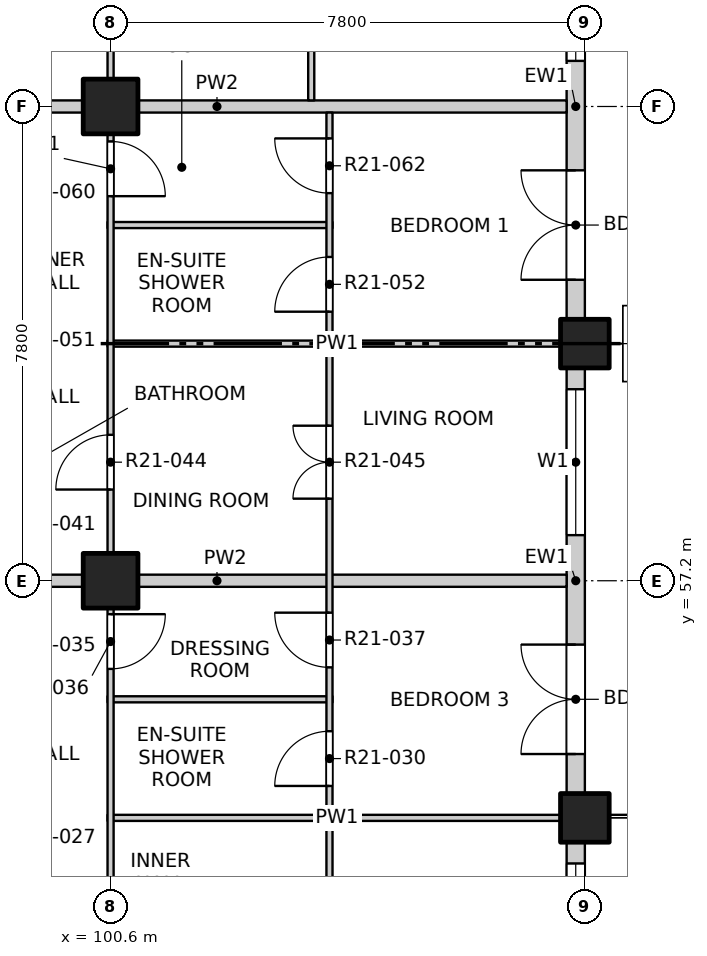
"""IFC4 building model, lengths in metres.
Left out: names, types, materials, properties, quantities, classifications, styles, units other than length and angle.
Written with IfcOpenShell. Run it as: python <this file> out.ifc"""

import sys

from ifc_helpers import new_model, si_unit, direction, frame, frame_2d, origin, origin_2d, place, context, subcontext, project, spatial, rectangle, extrude, element, fill, save


model = new_model("IFC4")
c1 = context("Model", 3, precision=1e-05, world=origin(), true_north=direction((0.0, 1.0)))
c2 = subcontext(c1, "Body", "Model", "MODEL_VIEW")
j1 = project(units=[si_unit("LENGTHUNIT", "METRE"), si_unit("PLANEANGLEUNIT", "RADIAN")], contexts=[c1])
p1 = place(None, origin())
s1 = spatial("IfcSite", under=j1, at=p1, CompositionType="ELEMENT")
p2 = place(p1, origin())
s2 = spatial("IfcBuilding", under=s1, at=p2, CompositionType="ELEMENT")
p3 = place(p2, frame((0.0, 0.0, 214.3)))
s3 = spatial("IfcBuildingStorey", under=s2, at=p3, CompositionType="ELEMENT", Elevation=214.3)
for number, where, z_axis, x_axis in (
    (1, (108.4, 53.3, -0.25), (0.0, 0.0, 1.0), (1.0, 0.0, 0.0)),
    (2, (108.4, 61.1, -0.25), (0.0, 0.0, 1.0), (1.0, 0.0, 0.0)),
):
    element("IfcColumn", number, at=place(p3, frame(where, z_axis=z_axis, x_axis=x_axis)), inside=s3, PredefinedType="COLUMN", context=c2, shape_type="SweptSolid", body=[
        extrude(rectangle(XDim=0.8, YDim=0.8, at=origin_2d()), origin(), (0.0, 0.0, 1.0), 3.4),
    ])
for number, where, z_axis, x_axis in (
    (3, (100.6, 57.2, -0.25), (0.0, 0.0, 1.0), (1.0, 0.0, 0.0)),
    (4, (100.6, 65.0, -0.25), (0.0, 0.0, 1.0), (1.0, 0.0, 0.0)),
):
    element("IfcColumn", number, at=place(p3, frame(where, z_axis=z_axis, x_axis=x_axis)), inside=s3, PredefinedType="COLUMN", context=c2, shape_type="SweptSolid", body=[
        extrude(rectangle(XDim=0.9, YDim=0.9, at=origin_2d()), origin(), (0.0, 0.0, 1.0), 3.4),
    ])
p4 = place(p3, frame((108.25, 45.5, 0.0), z_axis=(0.0, 0.0, 1.0), x_axis=(0.0, 1.0, 0.0)))
e5 = element("IfcWall", 5, at=p4, inside=s3, PredefinedType="SOLIDWALL", context=c2, shape_type="SweptSolid", body=[
    extrude(rectangle(XDim=7.4, YDim=0.3, at=frame_2d((3.7, 0.0))), origin(), (0.0, 0.0, 1.0), 2.7),
])
p5 = place(p4, frame((0.75, 0.0, 0.9)))
e6 = element("IfcOpeningElement", 6, at=p5, cuts=e5, PredefinedType="OPENING", context=c2, shape_type="SweptSolid", body=[
    extrude(rectangle(XDim=2.4, YDim=1.8, at=frame_2d((1.2, 0.9))), frame((0.0, 0.16, 0.0), z_axis=(0.0, -1.0, 0.0), x_axis=(1.0, 0.0, 0.0)), (0.0, 0.0, 1.0), 0.32),
])
p6 = place(p4, frame((4.65, 0.0, 0.9)))
e7 = element("IfcOpeningElement", 7, at=p6, cuts=e5, PredefinedType="OPENING", context=c2, shape_type="SweptSolid", body=[
    extrude(rectangle(XDim=2.4, YDim=1.8, at=frame_2d((1.2, 0.9))), frame((0.0, 0.16, 0.0), z_axis=(0.0, -1.0, 0.0), x_axis=(1.0, 0.0, 0.0)), (0.0, 0.0, 1.0), 0.32),
])
p7 = place(p3, frame((108.25, 53.7, 0.0), z_axis=(0.0, 0.0, 1.0), x_axis=(0.0, 1.0, 0.0)))
e8 = element("IfcWall", 8, at=p7, inside=s3, PredefinedType="SOLIDWALL", context=c2, shape_type="SweptSolid", body=[
    extrude(rectangle(XDim=7.0, YDim=0.3, at=frame_2d((3.5, 0.0))), origin(), (0.0, 0.0, 1.0), 2.7),
])
p8 = place(p7, frame((0.65, 0.0, 0.0)))
e9 = element("IfcOpeningElement", 9, at=p8, cuts=e8, PredefinedType="OPENING", context=c2, shape_type="SweptSolid", body=[
    extrude(rectangle(XDim=1.8, YDim=2.4, at=frame_2d((0.9, 1.2))), frame((0.0, 0.16, 0.0), z_axis=(0.0, -1.0, 0.0), x_axis=(1.0, 0.0, 0.0)), (0.0, 0.0, 1.0), 0.32),
])
p9 = place(p7, frame((4.25, 0.0, 0.9)))
e10 = element("IfcOpeningElement", 10, at=p9, cuts=e8, PredefinedType="OPENING", context=c2, shape_type="SweptSolid", body=[
    extrude(rectangle(XDim=2.4, YDim=1.8, at=frame_2d((1.2, 0.9))), frame((0.0, 0.16, 0.0), z_axis=(0.0, -1.0, 0.0), x_axis=(1.0, 0.0, 0.0)), (0.0, 0.0, 1.0), 0.32),
])
p10 = place(p3, frame((108.25, 61.5, 0.0), z_axis=(0.0, 0.0, 1.0), x_axis=(0.0, 1.0, 0.0)))
e11 = element("IfcWall", 11, at=p10, inside=s3, PredefinedType="SOLIDWALL", context=c2, shape_type="SweptSolid", body=[
    extrude(rectangle(XDim=7.0, YDim=0.3, at=frame_2d((3.5, 0.0))), origin(), (0.0, 0.0, 1.0), 2.7),
])
p11 = place(p10, frame((0.65, 0.0, 0.0)))
e12 = element("IfcOpeningElement", 12, at=p11, cuts=e11, PredefinedType="OPENING", context=c2, shape_type="SweptSolid", body=[
    extrude(rectangle(XDim=1.8, YDim=2.4, at=frame_2d((0.9, 1.2))), frame((0.0, 0.16, 0.0), z_axis=(0.0, -1.0, 0.0), x_axis=(1.0, 0.0, 0.0)), (0.0, 0.0, 1.0), 0.32),
])
p12 = place(p10, frame((4.25, 0.0, 0.9)))
e13 = element("IfcOpeningElement", 13, at=p12, cuts=e11, PredefinedType="OPENING", context=c2, shape_type="SweptSolid", body=[
    extrude(rectangle(XDim=2.4, YDim=1.8, at=frame_2d((1.2, 0.9))), frame((0.0, 0.16, 0.0), z_axis=(0.0, -1.0, 0.0), x_axis=(1.0, 0.0, 0.0)), (0.0, 0.0, 1.0), 0.32),
])
p13 = place(p3, frame((100.55, 53.3, 0.0), z_axis=(0.0, 0.0, 1.0), x_axis=(1.0, 0.0, 0.0)))
e14 = element("IfcWall", 14, at=p13, inside=s3, PredefinedType="PARTITIONING", context=c2, shape_type="SweptSolid", body=[
    extrude(rectangle(XDim=7.55, YDim=0.1, at=frame_2d((3.775, 0.0))), origin(), (0.0, 0.0, 1.0), 3.15),
])
p14 = place(p3, frame((100.55, 55.25, 0.0), z_axis=(0.0, 0.0, 1.0), x_axis=(1.0, 0.0, 0.0)))
e15 = element("IfcWall", 15, at=p14, inside=s3, PredefinedType="PARTITIONING", context=c2, shape_type="SweptSolid", body=[
    extrude(rectangle(XDim=3.7, YDim=0.1, at=frame_2d((1.85, 0.0))), origin(), (0.0, 0.0, 1.0), 3.15),
])
p15 = place(p3, frame((96.6, 57.2, 0.0), z_axis=(0.0, 0.0, 1.0), x_axis=(1.0, 0.0, 0.0)))
e16 = element("IfcWall", 16, at=p15, inside=s3, PredefinedType="PARTITIONING", context=c2, shape_type="SweptSolid", body=[
    extrude(rectangle(XDim=11.5, YDim=0.2, at=frame_2d((5.75, 0.0))), origin(), (0.0, 0.0, 1.0), 3.15),
])
p16 = place(p3, frame((100.55, 61.1, 0.0), z_axis=(0.0, 0.0, 1.0), x_axis=(1.0, 0.0, 0.0)))
e17 = element("IfcWall", 17, at=p16, inside=s3, PredefinedType="PARTITIONING", context=c2, shape_type="SweptSolid", body=[
    extrude(rectangle(XDim=7.55, YDim=0.1, at=frame_2d((3.775, 0.0))), origin(), (0.0, 0.0, 1.0), 2.55),
])
p17 = place(p3, frame((100.55, 63.05, 0.0), z_axis=(0.0, 0.0, 1.0), x_axis=(1.0, 0.0, 0.0)))
e18 = element("IfcWall", 18, at=p17, inside=s3, PredefinedType="PARTITIONING", context=c2, shape_type="SweptSolid", body=[
    extrude(rectangle(XDim=3.7, YDim=0.1, at=frame_2d((1.85, 0.0))), origin(), (0.0, 0.0, 1.0), 3.15),
])
p18 = place(p3, frame((96.6, 65.0, 0.0), z_axis=(0.0, 0.0, 1.0), x_axis=(1.0, 0.0, 0.0)))
e19 = element("IfcWall", 19, at=p18, inside=s3, PredefinedType="PARTITIONING", context=c2, shape_type="SweptSolid", body=[
    extrude(rectangle(XDim=11.5, YDim=0.2, at=frame_2d((5.75, 0.0))), origin(), (0.0, 0.0, 1.0), 3.15),
])
p19 = place(p3, frame((100.6, 41.9, 0.0), z_axis=(0.0, 0.0, 1.0), x_axis=(0.0, 1.0, 0.0)))
e20 = element("IfcWall", 20, at=p19, inside=s3, PredefinedType="PARTITIONING", context=c2, shape_type="SweptSolid", body=[
    extrude(rectangle(XDim=46.2, YDim=0.1, at=frame_2d((23.1, 0.0))), origin(), (0.0, 0.0, 1.0), 3.15),
])
p20 = place(p19, frame((1.2, 0.0, 0.0)))
e21 = element("IfcOpeningElement", 21, at=p20, cuts=e20, PredefinedType="OPENING", context=c2, shape_type="SweptSolid", body=[
    extrude(rectangle(XDim=0.9, YDim=2.1, at=frame_2d((0.45, 1.05))), frame((0.0, 0.06, 0.0), z_axis=(0.0, -1.0, 0.0), x_axis=(1.0, 0.0, 0.0)), (0.0, 0.0, 1.0), 0.12),
])
p21 = place(p19, frame((6.025, 0.0, 0.0)))
e22 = element("IfcOpeningElement", 22, at=p21, cuts=e20, PredefinedType="OPENING", context=c2, shape_type="SweptSolid", body=[
    extrude(rectangle(XDim=0.9, YDim=2.1, at=frame_2d((0.45, 1.05))), frame((0.0, 0.06, 0.0), z_axis=(0.0, -1.0, 0.0), x_axis=(1.0, 0.0, 0.0)), (0.0, 0.0, 1.0), 0.12),
])
p22 = place(p19, frame((9.0, 0.0, 0.0)))
e23 = element("IfcOpeningElement", 23, at=p22, cuts=e20, PredefinedType="OPENING", context=c2, shape_type="SweptSolid", body=[
    extrude(rectangle(XDim=0.9, YDim=2.1, at=frame_2d((0.45, 1.05))), frame((0.0, 0.06, 0.0), z_axis=(0.0, -1.0, 0.0), x_axis=(1.0, 0.0, 0.0)), (0.0, 0.0, 1.0), 0.12),
])
p23 = place(p19, frame((13.85, 0.0, 0.0)))
e24 = element("IfcOpeningElement", 24, at=p23, cuts=e20, PredefinedType="OPENING", context=c2, shape_type="SweptSolid", body=[
    extrude(rectangle(XDim=0.9, YDim=2.1, at=frame_2d((0.45, 1.05))), frame((0.0, 0.06, 0.0), z_axis=(0.0, -1.0, 0.0), x_axis=(1.0, 0.0, 0.0)), (0.0, 0.0, 1.0), 0.12),
])
p24 = place(p19, frame((16.8, 0.0, 0.0)))
e25 = element("IfcOpeningElement", 25, at=p24, cuts=e20, PredefinedType="OPENING", context=c2, shape_type="SweptSolid", body=[
    extrude(rectangle(XDim=0.9, YDim=2.1, at=frame_2d((0.45, 1.05))), frame((0.0, 0.06, 0.0), z_axis=(0.0, -1.0, 0.0), x_axis=(1.0, 0.0, 0.0)), (0.0, 0.0, 1.0), 0.12),
])
p25 = place(p19, frame((21.625, 0.0, 0.0)))
e26 = element("IfcOpeningElement", 26, at=p25, cuts=e20, PredefinedType="OPENING", context=c2, shape_type="SweptSolid", body=[
    extrude(rectangle(XDim=0.9, YDim=2.1, at=frame_2d((0.45, 1.05))), frame((0.0, 0.06, 0.0), z_axis=(0.0, -1.0, 0.0), x_axis=(1.0, 0.0, 0.0)), (0.0, 0.0, 1.0), 0.12),
])
p26 = place(p19, frame((24.6, 0.0, 0.0)))
e27 = element("IfcOpeningElement", 27, at=p26, cuts=e20, PredefinedType="OPENING", context=c2, shape_type="SweptSolid", body=[
    extrude(rectangle(XDim=0.9, YDim=2.1, at=frame_2d((0.45, 1.05))), frame((0.0, 0.06, 0.0), z_axis=(0.0, -1.0, 0.0), x_axis=(1.0, 0.0, 0.0)), (0.0, 0.0, 1.0), 0.12),
])
p27 = place(p19, frame((29.425, 0.0, 0.0)))
e28 = element("IfcOpeningElement", 28, at=p27, cuts=e20, PredefinedType="OPENING", context=c2, shape_type="SweptSolid", body=[
    extrude(rectangle(XDim=0.9, YDim=2.1, at=frame_2d((0.45, 1.05))), frame((0.0, 0.06, 0.0), z_axis=(0.0, -1.0, 0.0), x_axis=(1.0, 0.0, 0.0)), (0.0, 0.0, 1.0), 0.12),
])
p28 = place(p19, frame((33.375, 0.0, 0.0)))
e29 = element("IfcOpeningElement", 29, at=p28, cuts=e20, PredefinedType="OPENING", context=c2, shape_type="SweptSolid", body=[
    extrude(rectangle(XDim=0.9, YDim=2.1, at=frame_2d((0.45, 1.05))), frame((0.0, 0.06, 0.0), z_axis=(0.0, -1.0, 0.0), x_axis=(1.0, 0.0, 0.0)), (0.0, 0.0, 1.0), 0.12),
])
p29 = place(p19, frame((36.3, 0.0, 0.0)))
e30 = element("IfcOpeningElement", 30, at=p29, cuts=e20, PredefinedType="OPENING", context=c2, shape_type="SweptSolid", body=[
    extrude(rectangle(XDim=0.9, YDim=2.1, at=frame_2d((0.45, 1.05))), frame((0.0, 0.06, 0.0), z_axis=(0.0, -1.0, 0.0), x_axis=(1.0, 0.0, 0.0)), (0.0, 0.0, 1.0), 0.12),
])
p30 = place(p19, frame((41.175, 0.0, 0.0)))
e31 = element("IfcOpeningElement", 31, at=p30, cuts=e20, PredefinedType="OPENING", context=c2, shape_type="SweptSolid", body=[
    extrude(rectangle(XDim=0.9, YDim=2.1, at=frame_2d((0.45, 1.05))), frame((0.0, 0.06, 0.0), z_axis=(0.0, -1.0, 0.0), x_axis=(1.0, 0.0, 0.0)), (0.0, 0.0, 1.0), 0.12),
])
p31 = place(p19, frame((44.1, 0.0, 0.0)))
e32 = element("IfcOpeningElement", 32, at=p31, cuts=e20, PredefinedType="OPENING", context=c2, shape_type="SweptSolid", body=[
    extrude(rectangle(XDim=0.9, YDim=2.1, at=frame_2d((0.45, 1.05))), frame((0.0, 0.06, 0.0), z_axis=(0.0, -1.0, 0.0), x_axis=(1.0, 0.0, 0.0)), (0.0, 0.0, 1.0), 0.12),
])
p32 = place(p3, frame((103.9, 65.1, 0.0), z_axis=(0.0, 0.0, 1.0), x_axis=(0.0, 1.0, 0.0)))
e33 = element("IfcWall", 33, at=p32, inside=s3, PredefinedType="PARTITIONING", context=c2, shape_type="SweptSolid", body=[
    extrude(rectangle(XDim=11.5, YDim=0.1, at=frame_2d((5.75, 0.0))), origin(), (0.0, 0.0, 1.0), 3.15),
])
p33 = place(p32, frame((1.25, 0.0, 0.0)))
e34 = element("IfcOpeningElement", 34, at=p33, cuts=e33, PredefinedType="OPENING", context=c2, shape_type="SweptSolid", body=[
    extrude(rectangle(XDim=1.2, YDim=2.1, at=frame_2d((0.6, 1.05))), frame((0.0, 0.06, 0.0), z_axis=(0.0, -1.0, 0.0), x_axis=(1.0, 0.0, 0.0)), (0.0, 0.0, 1.0), 0.12),
])
p34 = place(p32, frame((4.325, 0.0, 0.0)))
e35 = element("IfcOpeningElement", 35, at=p34, cuts=e33, PredefinedType="OPENING", context=c2, shape_type="SweptSolid", body=[
    extrude(rectangle(XDim=0.9, YDim=2.1, at=frame_2d((0.45, 1.05))), frame((0.0, 0.06, 0.0), z_axis=(0.0, -1.0, 0.0), x_axis=(1.0, 0.0, 0.0)), (0.0, 0.0, 1.0), 0.12),
])
p35 = place(p32, frame((6.275, 0.0, 0.0)))
e36 = element("IfcOpeningElement", 36, at=p35, cuts=e33, PredefinedType="OPENING", context=c2, shape_type="SweptSolid", body=[
    extrude(rectangle(XDim=0.9, YDim=2.1, at=frame_2d((0.45, 1.05))), frame((0.0, 0.06, 0.0), z_axis=(0.0, -1.0, 0.0), x_axis=(1.0, 0.0, 0.0)), (0.0, 0.0, 1.0), 0.12),
])
p36 = place(p32, frame((8.225, 0.0, 0.0)))
e37 = element("IfcOpeningElement", 37, at=p36, cuts=e33, PredefinedType="OPENING", context=c2, shape_type="SweptSolid", body=[
    extrude(rectangle(XDim=0.9, YDim=2.1, at=frame_2d((0.45, 1.05))), frame((0.0, 0.06, 0.0), z_axis=(0.0, -1.0, 0.0), x_axis=(1.0, 0.0, 0.0)), (0.0, 0.0, 1.0), 0.12),
])
p37 = place(p32, frame((10.175, 0.0, 0.0)))
e38 = element("IfcOpeningElement", 38, at=p37, cuts=e33, PredefinedType="OPENING", context=c2, shape_type="SweptSolid", body=[
    extrude(rectangle(XDim=0.9, YDim=2.1, at=frame_2d((0.45, 1.05))), frame((0.0, 0.06, 0.0), z_axis=(0.0, -1.0, 0.0), x_axis=(1.0, 0.0, 0.0)), (0.0, 0.0, 1.0), 0.12),
])
p38 = place(p3, frame((104.2, 41.9, 0.0), z_axis=(0.0, 0.0, 1.0), x_axis=(0.0, 1.0, 0.0)))
e39 = element("IfcWall", 39, at=p38, inside=s3, PredefinedType="PARTITIONING", context=c2, shape_type="SweptSolid", body=[
    extrude(rectangle(XDim=23.0, YDim=0.1, at=frame_2d((11.5, 0.0))), origin(), (0.0, 0.0, 1.0), 3.15),
])
p39 = place(p38, frame((1.05, 0.0, 0.0)))
e40 = element("IfcOpeningElement", 40, at=p39, cuts=e39, PredefinedType="OPENING", context=c2, shape_type="SweptSolid", body=[
    extrude(rectangle(XDim=1.2, YDim=2.1, at=frame_2d((0.6, 1.05))), frame((0.0, 0.06, 0.0), z_axis=(0.0, -1.0, 0.0), x_axis=(1.0, 0.0, 0.0)), (0.0, 0.0, 1.0), 0.12),
])
p40 = place(p38, frame((4.125, 0.0, 0.0)))
e41 = element("IfcOpeningElement", 41, at=p40, cuts=e39, PredefinedType="OPENING", context=c2, shape_type="SweptSolid", body=[
    extrude(rectangle(XDim=0.9, YDim=2.1, at=frame_2d((0.45, 1.05))), frame((0.0, 0.06, 0.0), z_axis=(0.0, -1.0, 0.0), x_axis=(1.0, 0.0, 0.0)), (0.0, 0.0, 1.0), 0.12),
])
p41 = place(p38, frame((6.075, 0.0, 0.0)))
e42 = element("IfcOpeningElement", 42, at=p41, cuts=e39, PredefinedType="OPENING", context=c2, shape_type="SweptSolid", body=[
    extrude(rectangle(XDim=0.9, YDim=2.1, at=frame_2d((0.45, 1.05))), frame((0.0, 0.06, 0.0), z_axis=(0.0, -1.0, 0.0), x_axis=(1.0, 0.0, 0.0)), (0.0, 0.0, 1.0), 0.12),
])
p42 = place(p38, frame((8.85, 0.0, 0.0)))
e43 = element("IfcOpeningElement", 43, at=p42, cuts=e39, PredefinedType="OPENING", context=c2, shape_type="SweptSolid", body=[
    extrude(rectangle(XDim=1.2, YDim=2.1, at=frame_2d((0.6, 1.05))), frame((0.0, 0.06, 0.0), z_axis=(0.0, -1.0, 0.0), x_axis=(1.0, 0.0, 0.0)), (0.0, 0.0, 1.0), 0.12),
])
p43 = place(p38, frame((11.925, 0.0, 0.0)))
e44 = element("IfcOpeningElement", 44, at=p43, cuts=e39, PredefinedType="OPENING", context=c2, shape_type="SweptSolid", body=[
    extrude(rectangle(XDim=0.9, YDim=2.1, at=frame_2d((0.45, 1.05))), frame((0.0, 0.06, 0.0), z_axis=(0.0, -1.0, 0.0), x_axis=(1.0, 0.0, 0.0)), (0.0, 0.0, 1.0), 0.12),
])
p44 = place(p38, frame((13.875, 0.0, 0.0)))
e45 = element("IfcOpeningElement", 45, at=p44, cuts=e39, PredefinedType="OPENING", context=c2, shape_type="SweptSolid", body=[
    extrude(rectangle(XDim=0.9, YDim=2.1, at=frame_2d((0.45, 1.05))), frame((0.0, 0.06, 0.0), z_axis=(0.0, -1.0, 0.0), x_axis=(1.0, 0.0, 0.0)), (0.0, 0.0, 1.0), 0.12),
])
p45 = place(p38, frame((16.65, 0.0, 0.0)))
e46 = element("IfcOpeningElement", 46, at=p45, cuts=e39, PredefinedType="OPENING", context=c2, shape_type="SweptSolid", body=[
    extrude(rectangle(XDim=1.2, YDim=2.1, at=frame_2d((0.6, 1.05))), frame((0.0, 0.06, 0.0), z_axis=(0.0, -1.0, 0.0), x_axis=(1.0, 0.0, 0.0)), (0.0, 0.0, 1.0), 0.12),
])
p46 = place(p38, frame((19.725, 0.0, 0.0)))
e47 = element("IfcOpeningElement", 47, at=p46, cuts=e39, PredefinedType="OPENING", context=c2, shape_type="SweptSolid", body=[
    extrude(rectangle(XDim=0.9, YDim=2.1, at=frame_2d((0.45, 1.05))), frame((0.0, 0.06, 0.0), z_axis=(0.0, -1.0, 0.0), x_axis=(1.0, 0.0, 0.0)), (0.0, 0.0, 1.0), 0.12),
])
p47 = place(p38, frame((21.675, 0.0, 0.0)))
e48 = element("IfcOpeningElement", 48, at=p47, cuts=e39, PredefinedType="OPENING", context=c2, shape_type="SweptSolid", body=[
    extrude(rectangle(XDim=0.9, YDim=2.1, at=frame_2d((0.45, 1.05))), frame((0.0, 0.06, 0.0), z_axis=(0.0, -1.0, 0.0), x_axis=(1.0, 0.0, 0.0)), (0.0, 0.0, 1.0), 0.12),
])
p48 = place(p6, origin())
e49 = element("IfcWindow", 49, at=p48, inside=s3, PartitioningType="DOUBLE_PANEL_VERTICAL", PredefinedType="WINDOW", context=c2, shape_type="SweptSolid", body=[
    extrude(rectangle(XDim=2.4, YDim=1.8, at=frame_2d((1.2, 0.9))), frame((0.0, 0.03, 0.0), z_axis=(0.0, -1.0, 0.0), x_axis=(1.0, 0.0, 0.0)), (0.0, 0.0, 1.0), 0.06),
])
fill(e7, e49)
p49 = place(p8, origin())
e50 = element("IfcDoor", 50, at=p49, inside=s3, OperationType="DOUBLE_DOOR_SINGLE_SWING", PredefinedType="DOOR", context=c2, shape_type="SweptSolid", body=[
    extrude(rectangle(XDim=1.8, YDim=2.4, at=frame_2d((0.9, 1.2))), frame((0.0, 0.025, 0.0), z_axis=(0.0, -1.0, 0.0), x_axis=(1.0, 0.0, 0.0)), (0.0, 0.0, 1.0), 0.05),
])
fill(e9, e50)
p50 = place(p9, origin())
e51 = element("IfcWindow", 51, at=p50, inside=s3, PartitioningType="DOUBLE_PANEL_VERTICAL", PredefinedType="WINDOW", context=c2, shape_type="SweptSolid", body=[
    extrude(rectangle(XDim=2.4, YDim=1.8, at=frame_2d((1.2, 0.9))), frame((0.0, 0.03, 0.0), z_axis=(0.0, -1.0, 0.0), x_axis=(1.0, 0.0, 0.0)), (0.0, 0.0, 1.0), 0.06),
])
fill(e10, e51)
p51 = place(p11, origin())
e52 = element("IfcDoor", 52, at=p51, inside=s3, OperationType="DOUBLE_DOOR_SINGLE_SWING", PredefinedType="DOOR", context=c2, shape_type="SweptSolid", body=[
    extrude(rectangle(XDim=1.8, YDim=2.4, at=frame_2d((0.9, 1.2))), frame((0.0, 0.025, 0.0), z_axis=(0.0, -1.0, 0.0), x_axis=(1.0, 0.0, 0.0)), (0.0, 0.0, 1.0), 0.05),
])
fill(e12, e52)
p52 = place(p12, origin())
e53 = element("IfcWindow", 53, at=p52, inside=s3, PartitioningType="DOUBLE_PANEL_VERTICAL", PredefinedType="WINDOW", context=c2, shape_type="SweptSolid", body=[
    extrude(rectangle(XDim=2.4, YDim=1.8, at=frame_2d((1.2, 0.9))), frame((0.0, 0.03, 0.0), z_axis=(0.0, -1.0, 0.0), x_axis=(1.0, 0.0, 0.0)), (0.0, 0.0, 1.0), 0.06),
])
fill(e13, e53)
p53 = place(p43, origin())
e54 = element("IfcDoor", 54, at=p53, inside=s3, OperationType="SINGLE_SWING_LEFT", PredefinedType="DOOR", context=c2, shape_type="SweptSolid", body=[
    extrude(rectangle(XDim=0.9, YDim=2.1, at=frame_2d((0.45, 1.05))), frame((0.0, 0.025, 0.0), z_axis=(0.0, -1.0, 0.0), x_axis=(1.0, 0.0, 0.0)), (0.0, 0.0, 1.0), 0.05),
])
fill(e44, e54)
p54 = place(p23, origin())
e55 = element("IfcDoor", 55, at=p54, inside=s3, OperationType="SINGLE_SWING_LEFT", PredefinedType="DOOR", context=c2, shape_type="SweptSolid", body=[
    extrude(rectangle(XDim=0.9, YDim=2.1, at=frame_2d((0.45, 1.05))), frame((0.0, 0.025, 0.0), z_axis=(0.0, -1.0, 0.0), x_axis=(1.0, 0.0, 0.0)), (0.0, 0.0, 1.0), 0.05),
])
fill(e24, e55)
p55 = place(p44, origin())
e56 = element("IfcDoor", 56, at=p55, inside=s3, OperationType="SINGLE_SWING_RIGHT", PredefinedType="DOOR", context=c2, shape_type="SweptSolid", body=[
    extrude(rectangle(XDim=0.9, YDim=2.1, at=frame_2d((0.45, 1.05))), frame((0.0, 0.025, 0.0), z_axis=(0.0, -1.0, 0.0), x_axis=(1.0, 0.0, 0.0)), (0.0, 0.0, 1.0), 0.05),
])
fill(e45, e56)
p56 = place(p24, origin())
e57 = element("IfcDoor", 57, at=p56, inside=s3, OperationType="SINGLE_SWING_LEFT", PredefinedType="DOOR", context=c2, shape_type="SweptSolid", body=[
    extrude(rectangle(XDim=0.9, YDim=2.1, at=frame_2d((0.45, 1.05))), frame((0.0, 0.025, 0.0), z_axis=(0.0, -1.0, 0.0), x_axis=(1.0, 0.0, 0.0)), (0.0, 0.0, 1.0), 0.05),
])
fill(e25, e57)
p57 = place(p45, origin())
e58 = element("IfcDoor", 58, at=p57, inside=s3, OperationType="DOUBLE_DOOR_SINGLE_SWING", PredefinedType="DOOR", context=c2, shape_type="SweptSolid", body=[
    extrude(rectangle(XDim=1.2, YDim=2.1, at=frame_2d((0.6, 1.05))), frame((0.0, 0.025, 0.0), z_axis=(0.0, -1.0, 0.0), x_axis=(1.0, 0.0, 0.0)), (0.0, 0.0, 1.0), 0.05),
])
fill(e46, e58)
p58 = place(p46, origin())
e59 = element("IfcDoor", 59, at=p58, inside=s3, OperationType="SINGLE_SWING_LEFT", PredefinedType="DOOR", context=c2, shape_type="SweptSolid", body=[
    extrude(rectangle(XDim=0.9, YDim=2.1, at=frame_2d((0.45, 1.05))), frame((0.0, 0.025, 0.0), z_axis=(0.0, -1.0, 0.0), x_axis=(1.0, 0.0, 0.0)), (0.0, 0.0, 1.0), 0.05),
])
fill(e47, e59)
p59 = place(p25, origin())
e60 = element("IfcDoor", 60, at=p59, inside=s3, OperationType="SINGLE_SWING_RIGHT", PredefinedType="DOOR", context=c2, shape_type="SweptSolid", body=[
    extrude(rectangle(XDim=0.9, YDim=2.1, at=frame_2d((0.45, 1.05))), frame((0.0, 0.025, 0.0), z_axis=(0.0, -1.0, 0.0), x_axis=(1.0, 0.0, 0.0)), (0.0, 0.0, 1.0), 0.05),
])
fill(e26, e60)
p60 = place(p47, origin())
e61 = element("IfcDoor", 61, at=p60, inside=s3, OperationType="SINGLE_SWING_RIGHT", PredefinedType="DOOR", context=c2, shape_type="SweptSolid", body=[
    extrude(rectangle(XDim=0.9, YDim=2.1, at=frame_2d((0.45, 1.05))), frame((0.0, 0.025, 0.0), z_axis=(0.0, -1.0, 0.0), x_axis=(1.0, 0.0, 0.0)), (0.0, 0.0, 1.0), 0.05),
])
fill(e48, e61)
save(model, sys.argv[1])
